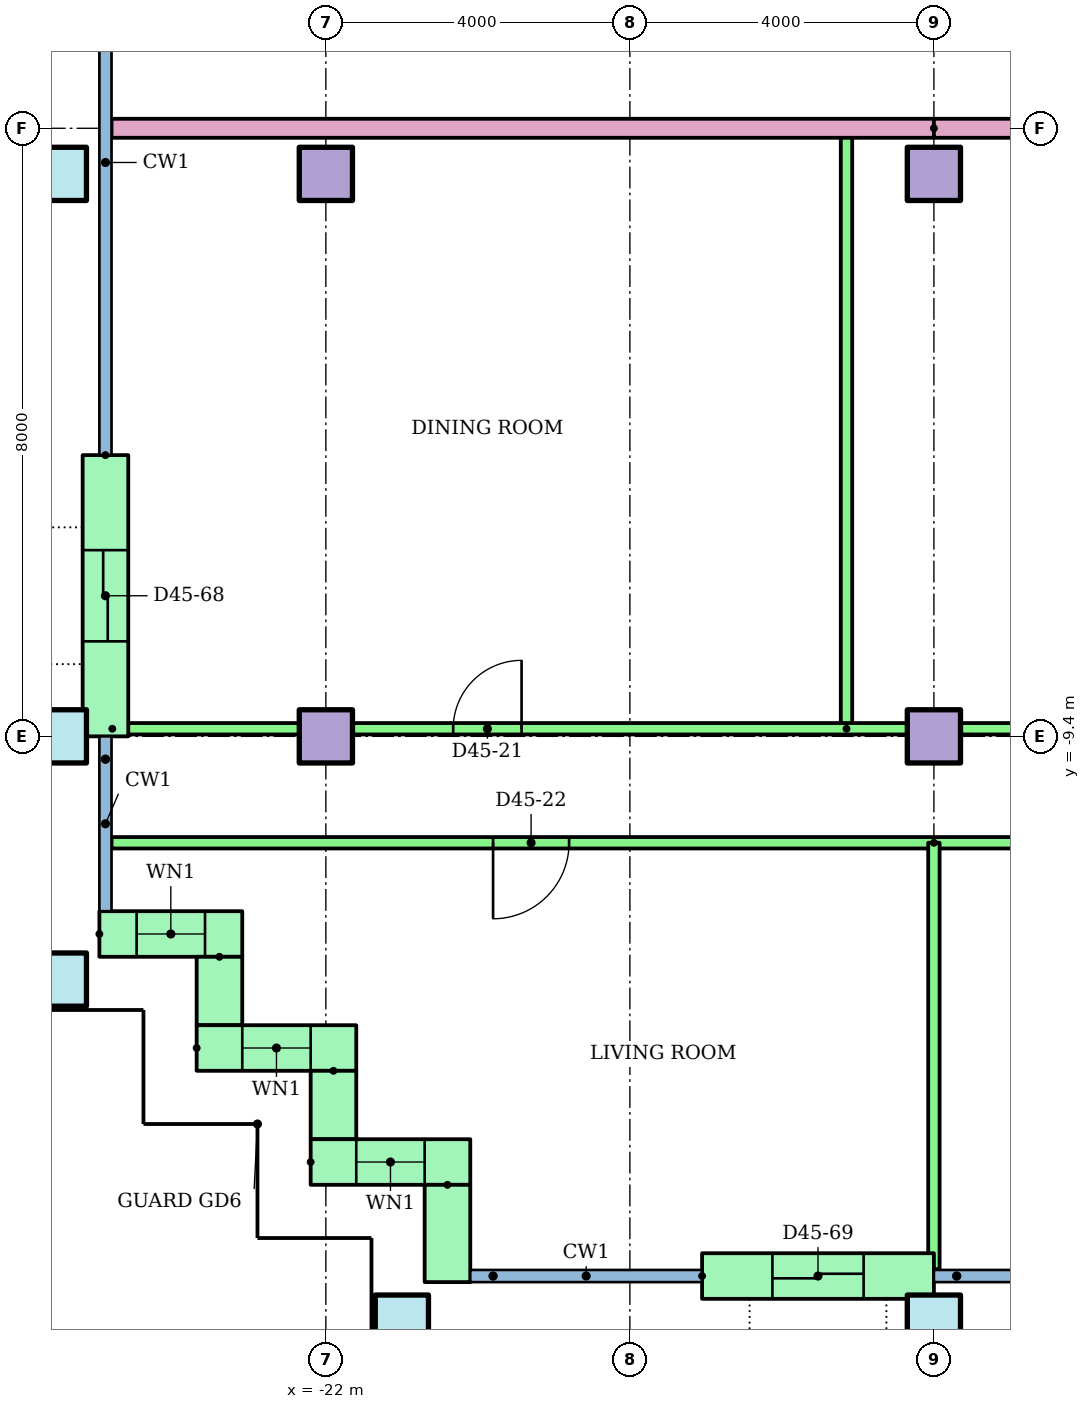
"""IFC4 building model, lengths in metres.
Left out: names, types, materials, properties, quantities, classifications, styles, units other than length and angle.
Written with IfcOpenShell. Run it as: python <this file> out.ifc"""

import sys

from ifc_helpers import new_model, si_unit, direction, frame, frame_2d, origin, origin_2d, place, context, subcontext, project, spatial, rectangle, hollow_rectangle, extrude, element, fill, save


model = new_model("IFC4")
c1 = context("Model", 3, precision=1e-05, world=origin(), true_north=direction((0.0, 1.0)))
c2 = subcontext(c1, "Body", "Model", "MODEL_VIEW")
j1 = project(units=[si_unit("LENGTHUNIT", "METRE"), si_unit("PLANEANGLEUNIT", "RADIAN")], contexts=[c1])
p1 = place(None, origin())
s1 = spatial("IfcSite", under=j1, at=p1, CompositionType="ELEMENT")
p2 = place(p1, origin())
s2 = spatial("IfcBuilding", under=s1, at=p2, CompositionType="ELEMENT")
p3 = place(p2, frame((0.0, 0.0, 174.9)))
s3 = spatial("IfcBuildingStorey", under=s2, at=p3, CompositionType="ELEMENT", Elevation=174.9)
for number, where in (
    (1, (-21.0, -17.1, 0.0)),
    (2, (-14.0, -17.1, 0.0)),
    (3, (-25.5, -12.6, 0.0)),
    (4, (-25.5, -9.4, 0.0)),
):
    element("IfcColumn", number, at=place(p3, frame(where)), inside=s3, PredefinedType="COLUMN", context=c2, shape_type="SweptSolid", body=[
        extrude(hollow_rectangle(XDim=0.7, YDim=0.7, WallThickness=0.036, at=origin_2d()), origin(), (0.0, 0.0, 1.0), 3.2),
    ])
for number, where in (
    (5, (-22.0, -9.4, 0.0)),
    (6, (-14.0, -9.4, 0.0)),
):
    element("IfcColumn", number, at=place(p3, frame(where)), inside=s3, PredefinedType="COLUMN", context=c2, shape_type="SweptSolid", body=[
        extrude(rectangle(XDim=0.7, YDim=0.7, at=origin_2d()), origin(), (0.0, 0.0, 1.0), 3.2),
    ])
p4 = place(p3, frame((-25.5, -2.0, 0.0)))
e7 = element("IfcColumn", 7, at=p4, inside=s3, PredefinedType="COLUMN", context=c2, shape_type="SweptSolid", body=[
    extrude(hollow_rectangle(XDim=0.7, YDim=0.7, WallThickness=0.036, at=origin_2d()), origin(), (0.0, 0.0, 1.0), 3.2),
])
for number, where in (
    (8, (-22.0, -2.0, 0.0)),
    (9, (-14.0, -2.0, 0.0)),
):
    element("IfcColumn", number, at=place(p3, frame(where)), inside=s3, PredefinedType="COLUMN", context=c2, shape_type="SweptSolid", body=[
        extrude(rectangle(XDim=0.7, YDim=0.7, at=origin_2d()), origin(), (0.0, 0.0, 1.0), 3.2),
    ])
p5 = place(p3, frame((-24.9, -5.7, 0.0), z_axis=(0.0, 0.0, 1.0), x_axis=(0.0, -1.0, 0.0)))
e10 = element("IfcWall", 10, at=p5, inside=s3, PredefinedType="STANDARD", context=c2, shape_type="SweptSolid", body=[
    extrude(rectangle(XDim=3.7, YDim=0.6, at=frame_2d((1.85, 0.0))), origin(), (0.0, 0.0, 1.0), 2.92),
])
p6 = place(p5, frame((1.25, 0.0, 0.0)))
e11 = element("IfcOpeningElement", 11, at=p6, cuts=e10, PredefinedType="OPENING", context=c2, shape_type="SweptSolid", body=[
    extrude(rectangle(XDim=1.2, YDim=2.1, at=frame_2d((0.6, 1.05))), frame((0.0, 0.31, 0.0), z_axis=(0.0, -1.0, 0.0), x_axis=(1.0, 0.0, 0.0)), (0.0, 0.0, 1.0), 0.62),
])
p7 = place(p3, frame((-24.98, -12.0, 0.0)))
e12 = element("IfcWall", 12, at=p7, inside=s3, PredefinedType="STANDARD", context=c2, shape_type="SweptSolid", body=[
    extrude(rectangle(XDim=1.88, YDim=0.6, at=frame_2d((0.94, 0.0))), origin(), (0.0, 0.0, 1.0), 2.92),
])
p8 = place(p7, frame((0.49, 0.0, 0.9)))
e13 = element("IfcOpeningElement", 13, at=p8, cuts=e12, PredefinedType="OPENING", context=c2, shape_type="SweptSolid", body=[
    extrude(rectangle(XDim=0.9, YDim=1.5, at=frame_2d((0.45, 0.75))), frame((0.0, 0.31, 0.0), z_axis=(0.0, -1.0, 0.0), x_axis=(1.0, 0.0, 0.0)), (0.0, 0.0, 1.0), 0.62),
])
p9 = place(p3, frame((-23.4, -12.3, 0.0), z_axis=(0.0, 0.0, 1.0), x_axis=(0.0, -1.0, 0.0)))
e14 = element("IfcWall", 14, at=p9, inside=s3, PredefinedType="STANDARD", context=c2, shape_type="SweptSolid", body=[
    extrude(rectangle(XDim=0.9, YDim=0.6, at=frame_2d((0.45, 0.0))), origin(), (0.0, 0.0, 1.0), 2.92),
])
p10 = place(p3, frame((-23.7, -13.5, 0.0)))
e15 = element("IfcWall", 15, at=p10, inside=s3, PredefinedType="STANDARD", context=c2, shape_type="SweptSolid", body=[
    extrude(rectangle(XDim=2.1, YDim=0.6, at=frame_2d((1.05, 0.0))), origin(), (0.0, 0.0, 1.0), 2.92),
])
p11 = place(p10, frame((0.6, 0.0, 0.9)))
e16 = element("IfcOpeningElement", 16, at=p11, cuts=e15, PredefinedType="OPENING", context=c2, shape_type="SweptSolid", body=[
    extrude(rectangle(XDim=0.9, YDim=1.5, at=frame_2d((0.45, 0.75))), frame((0.0, 0.31, 0.0), z_axis=(0.0, -1.0, 0.0), x_axis=(1.0, 0.0, 0.0)), (0.0, 0.0, 1.0), 0.62),
])
p12 = place(p3, frame((-21.9, -13.8, 0.0), z_axis=(0.0, 0.0, 1.0), x_axis=(0.0, -1.0, 0.0)))
e17 = element("IfcWall", 17, at=p12, inside=s3, PredefinedType="STANDARD", context=c2, shape_type="SweptSolid", body=[
    extrude(rectangle(XDim=0.9, YDim=0.6, at=frame_2d((0.45, 0.0))), origin(), (0.0, 0.0, 1.0), 2.92),
])
p13 = place(p3, frame((-22.2, -15.0, 0.0)))
e18 = element("IfcWall", 18, at=p13, inside=s3, PredefinedType="STANDARD", context=c2, shape_type="SweptSolid", body=[
    extrude(rectangle(XDim=2.1, YDim=0.6, at=frame_2d((1.05, 0.0))), origin(), (0.0, 0.0, 1.0), 2.92),
])
p14 = place(p13, frame((0.6, 0.0, 0.9)))
e19 = element("IfcOpeningElement", 19, at=p14, cuts=e18, PredefinedType="OPENING", context=c2, shape_type="SweptSolid", body=[
    extrude(rectangle(XDim=0.9, YDim=1.5, at=frame_2d((0.45, 0.75))), frame((0.0, 0.31, 0.0), z_axis=(0.0, -1.0, 0.0), x_axis=(1.0, 0.0, 0.0)), (0.0, 0.0, 1.0), 0.62),
])
p15 = place(p3, frame((-20.4, -15.3, 0.0), z_axis=(0.0, 0.0, 1.0), x_axis=(0.0, -1.0, 0.0)))
e20 = element("IfcWall", 20, at=p15, inside=s3, PredefinedType="STANDARD", context=c2, shape_type="SweptSolid", body=[
    extrude(rectangle(XDim=1.28, YDim=0.6, at=frame_2d((0.64, 0.0))), origin(), (0.0, 0.0, 1.0), 2.92),
])
p16 = place(p3, frame((-17.05, -16.5, 0.0)))
e21 = element("IfcWall", 21, at=p16, inside=s3, PredefinedType="STANDARD", context=c2, shape_type="SweptSolid", body=[
    extrude(rectangle(XDim=3.05, YDim=0.6, at=frame_2d((1.525, 0.0))), origin(), (0.0, 0.0, 1.0), 2.92),
])
p17 = place(p16, frame((0.925, 0.0, 0.0)))
e22 = element("IfcOpeningElement", 22, at=p17, cuts=e21, PredefinedType="OPENING", context=c2, shape_type="SweptSolid", body=[
    extrude(rectangle(XDim=1.2, YDim=2.1, at=frame_2d((0.6, 1.05))), frame((0.0, 0.31, 0.0), z_axis=(0.0, -1.0, 0.0), x_axis=(1.0, 0.0, 0.0)), (0.0, 0.0, 1.0), 0.62),
])
p18 = place(p3, frame((-15.15, -9.3, 0.0), z_axis=(0.0, 0.0, 1.0), x_axis=(0.0, 1.0, 0.0)))
e23 = element("IfcWall", 23, at=p18, inside=s3, PredefinedType="PARTITIONING", context=c2, shape_type="SweptSolid", body=[
    extrude(rectangle(XDim=7.9, YDim=0.15, at=frame_2d((3.95, 0.0))), origin(), (0.0, 0.0, 1.0), 2.4),
])
p19 = place(p3, frame((-24.81, -9.3, 0.0)))
e24 = element("IfcWall", 24, at=p19, inside=s3, PredefinedType="PARTITIONING", context=c2, shape_type="SweptSolid", body=[
    extrude(rectangle(XDim=24.81, YDim=0.15, at=frame_2d((12.405, 0.0))), origin(), (0.0, 0.0, 1.0), 2.4),
])
p20 = place(p19, frame((19.357, 0.0, 0.0)))
e25 = element("IfcOpeningElement", 25, at=p20, cuts=e24, PredefinedType="OPENING", context=c2, shape_type="SweptSolid", body=[
    extrude(rectangle(XDim=0.9, YDim=2.1, at=frame_2d((0.45, 1.05))), frame((0.0, 0.085, 0.0), z_axis=(0.0, -1.0, 0.0), x_axis=(1.0, 0.0, 0.0)), (0.0, 0.0, 1.0), 0.17),
])
p21 = place(p19, frame((12.835, 0.0, 0.0)))
e26 = element("IfcOpeningElement", 26, at=p21, cuts=e24, PredefinedType="OPENING", context=c2, shape_type="SweptSolid", body=[
    extrude(rectangle(XDim=0.9, YDim=2.1, at=frame_2d((0.45, 1.05))), frame((0.0, 0.085, 0.0), z_axis=(0.0, -1.0, 0.0), x_axis=(1.0, 0.0, 0.0)), (0.0, 0.0, 1.0), 0.17),
])
p22 = place(p19, frame((4.485, 0.0, 0.0)))
e27 = element("IfcOpeningElement", 27, at=p22, cuts=e24, PredefinedType="OPENING", context=c2, shape_type="SweptSolid", body=[
    extrude(rectangle(XDim=0.9, YDim=2.1, at=frame_2d((0.45, 1.05))), frame((0.0, 0.085, 0.0), z_axis=(0.0, -1.0, 0.0), x_axis=(1.0, 0.0, 0.0)), (0.0, 0.0, 1.0), 0.17),
])
p23 = place(p3, frame((2.0, -10.8, 0.0), z_axis=(0.0, 0.0, 1.0), x_axis=(-1.0, 0.0, 0.0)))
e28 = element("IfcWall", 28, at=p23, inside=s3, PredefinedType="PARTITIONING", context=c2, shape_type="SweptSolid", body=[
    extrude(rectangle(XDim=26.82, YDim=0.15, at=frame_2d((13.41, 0.0))), origin(), (0.0, 0.0, 1.0), 2.4),
])
p24 = place(p23, frame((20.8, 0.0, 0.0)))
e29 = element("IfcOpeningElement", 29, at=p24, cuts=e28, PredefinedType="OPENING", context=c2, shape_type="SweptSolid", body=[
    extrude(rectangle(XDim=1.0, YDim=2.1, at=frame_2d((0.5, 1.05))), frame((0.0, 0.085, 0.0), z_axis=(0.0, -1.0, 0.0), x_axis=(1.0, 0.0, 0.0)), (0.0, 0.0, 1.0), 0.17),
])
p25 = place(p23, frame((13.55, 0.0, 0.0)))
e30 = element("IfcOpeningElement", 30, at=p25, cuts=e28, PredefinedType="OPENING", context=c2, shape_type="SweptSolid", body=[
    extrude(rectangle(XDim=0.9, YDim=2.1, at=frame_2d((0.45, 1.05))), frame((0.0, 0.085, 0.0), z_axis=(0.0, -1.0, 0.0), x_axis=(1.0, 0.0, 0.0)), (0.0, 0.0, 1.0), 0.17),
])
p26 = place(p23, frame((9.55, 0.0, 0.0)))
e31 = element("IfcOpeningElement", 31, at=p26, cuts=e28, PredefinedType="OPENING", context=c2, shape_type="SweptSolid", body=[
    extrude(rectangle(XDim=0.9, YDim=2.1, at=frame_2d((0.45, 1.05))), frame((0.0, 0.085, 0.0), z_axis=(0.0, -1.0, 0.0), x_axis=(1.0, 0.0, 0.0)), (0.0, 0.0, 1.0), 0.17),
])
p27 = place(p23, frame((5.55, 0.0, 0.0)))
e32 = element("IfcOpeningElement", 32, at=p27, cuts=e28, PredefinedType="OPENING", context=c2, shape_type="SweptSolid", body=[
    extrude(rectangle(XDim=0.9, YDim=2.1, at=frame_2d((0.45, 1.05))), frame((0.0, 0.085, 0.0), z_axis=(0.0, -1.0, 0.0), x_axis=(1.0, 0.0, 0.0)), (0.0, 0.0, 1.0), 0.17),
])
p28 = place(p23, frame((1.55, 0.0, 0.0)))
e33 = element("IfcOpeningElement", 33, at=p28, cuts=e28, PredefinedType="OPENING", context=c2, shape_type="SweptSolid", body=[
    extrude(rectangle(XDim=0.9, YDim=2.1, at=frame_2d((0.45, 1.05))), frame((0.0, 0.085, 0.0), z_axis=(0.0, -1.0, 0.0), x_axis=(1.0, 0.0, 0.0)), (0.0, 0.0, 1.0), 0.17),
])
p29 = place(p3, frame((-14.0, -10.8, 0.0), z_axis=(0.0, 0.0, 1.0), x_axis=(0.0, -1.0, 0.0)))
e34 = element("IfcWall", 34, at=p29, inside=s3, PredefinedType="PARTITIONING", context=c2, shape_type="SweptSolid", body=[
    extrude(rectangle(XDim=5.61, YDim=0.15, at=frame_2d((2.805, 0.0))), origin(), (0.0, 0.0, 1.0), 2.4),
])
p30 = place(p3, frame((-14.0, -1.4, 0.0), z_axis=(0.0, 0.0, 1.0), x_axis=(-1.0, 0.0, 0.0)))
e35 = element("IfcWall", 35, at=p30, inside=s3, PredefinedType="PARTITIONING", context=c2, shape_type="SweptSolid", body=[
    extrude(rectangle(XDim=10.82, YDim=0.25, at=frame_2d((5.41, 0.0))), origin(), (0.0, 0.0, 1.0), 2.4),
])
p31 = place(p3, frame((14.0, -1.4, 0.0), z_axis=(0.0, 0.0, 1.0), x_axis=(-1.0, 0.0, 0.0)))
e36 = element("IfcWall", 36, at=p31, inside=s3, PredefinedType="PARTITIONING", context=c2, shape_type="SweptSolid", body=[
    extrude(rectangle(XDim=28.0, YDim=0.25, at=frame_2d((14.0, 0.0))), origin(), (0.0, 0.0, 1.0), 2.4),
])
p32 = place(p31, frame((12.547, 0.0, 0.0)))
e37 = element("IfcOpeningElement", 37, at=p32, cuts=e36, PredefinedType="OPENING", context=c2, shape_type="SweptSolid", body=[
    extrude(rectangle(XDim=1.0, YDim=2.1, at=frame_2d((0.5, 1.05))), frame((0.0, 0.135, 0.0), z_axis=(0.0, -1.0, 0.0), x_axis=(1.0, 0.0, 0.0)), (0.0, 0.0, 1.0), 0.27),
])
p33 = place(p31, frame((10.453, 0.0, 0.0)))
e38 = element("IfcOpeningElement", 38, at=p33, cuts=e36, PredefinedType="OPENING", context=c2, shape_type="SweptSolid", body=[
    extrude(rectangle(XDim=1.0, YDim=2.1, at=frame_2d((0.5, 1.05))), frame((0.0, 0.135, 0.0), z_axis=(0.0, -1.0, 0.0), x_axis=(1.0, 0.0, 0.0)), (0.0, 0.0, 1.0), 0.27),
])
p34 = place(p8, origin())
e39 = element("IfcWindow", 39, at=p34, inside=s3, PartitioningType="SINGLE_PANEL", PredefinedType="WINDOW", context=c2, shape_type="SweptSolid", body=[
    extrude(rectangle(XDim=0.9, YDim=1.5, at=frame_2d((0.45, 0.75))), frame((0.0, 0.03, 0.0), z_axis=(0.0, -1.0, 0.0), x_axis=(1.0, 0.0, 0.0)), (0.0, 0.0, 1.0), 0.06),
])
fill(e13, e39)
p35 = place(p11, origin())
e40 = element("IfcWindow", 40, at=p35, inside=s3, PartitioningType="SINGLE_PANEL", PredefinedType="WINDOW", context=c2, shape_type="SweptSolid", body=[
    extrude(rectangle(XDim=0.9, YDim=1.5, at=frame_2d((0.45, 0.75))), frame((0.0, 0.03, 0.0), z_axis=(0.0, -1.0, 0.0), x_axis=(1.0, 0.0, 0.0)), (0.0, 0.0, 1.0), 0.06),
])
fill(e16, e40)
p36 = place(p14, origin())
e41 = element("IfcWindow", 41, at=p36, inside=s3, PartitioningType="SINGLE_PANEL", PredefinedType="WINDOW", context=c2, shape_type="SweptSolid", body=[
    extrude(rectangle(XDim=0.9, YDim=1.5, at=frame_2d((0.45, 0.75))), frame((0.0, 0.03, 0.0), z_axis=(0.0, -1.0, 0.0), x_axis=(1.0, 0.0, 0.0)), (0.0, 0.0, 1.0), 0.06),
])
fill(e19, e41)
p37 = place(p22, origin())
e42 = element("IfcDoor", 42, at=p37, inside=s3, OperationType="SINGLE_SWING_RIGHT", PredefinedType="DOOR", context=c2, shape_type="SweptSolid", body=[
    extrude(rectangle(XDim=0.9, YDim=2.1, at=frame_2d((0.45, 1.05))), frame((0.0, 0.025, 0.0), z_axis=(0.0, -1.0, 0.0), x_axis=(1.0, 0.0, 0.0)), (0.0, 0.0, 1.0), 0.05),
])
fill(e27, e42)
p38 = place(p24, origin())
e43 = element("IfcDoor", 43, at=p38, inside=s3, OperationType="SINGLE_SWING_RIGHT", PredefinedType="DOOR", context=c2, shape_type="SweptSolid", body=[
    extrude(rectangle(XDim=1.0, YDim=2.1, at=frame_2d((0.5, 1.05))), frame((0.0, 0.025, 0.0), z_axis=(0.0, -1.0, 0.0), x_axis=(1.0, 0.0, 0.0)), (0.0, 0.0, 1.0), 0.05),
])
fill(e29, e43)
p39 = place(p6, origin())
e44 = element("IfcDoor", 44, at=p39, inside=s3, OperationType="SLIDING_TO_LEFT", PredefinedType="DOOR", context=c2, shape_type="SweptSolid", body=[
    extrude(rectangle(XDim=1.2, YDim=2.1, at=frame_2d((0.6, 1.05))), frame((0.0, 0.025, 0.0), z_axis=(0.0, -1.0, 0.0), x_axis=(1.0, 0.0, 0.0)), (0.0, 0.0, 1.0), 0.05),
])
fill(e11, e44)
p40 = place(p17, origin())
e45 = element("IfcDoor", 45, at=p40, inside=s3, OperationType="SLIDING_TO_LEFT", PredefinedType="DOOR", context=c2, shape_type="SweptSolid", body=[
    extrude(rectangle(XDim=1.2, YDim=2.1, at=frame_2d((0.6, 1.05))), frame((0.0, 0.025, 0.0), z_axis=(0.0, -1.0, 0.0), x_axis=(1.0, 0.0, 0.0)), (0.0, 0.0, 1.0), 0.05),
])
fill(e22, e45)
save(model, sys.argv[1])
